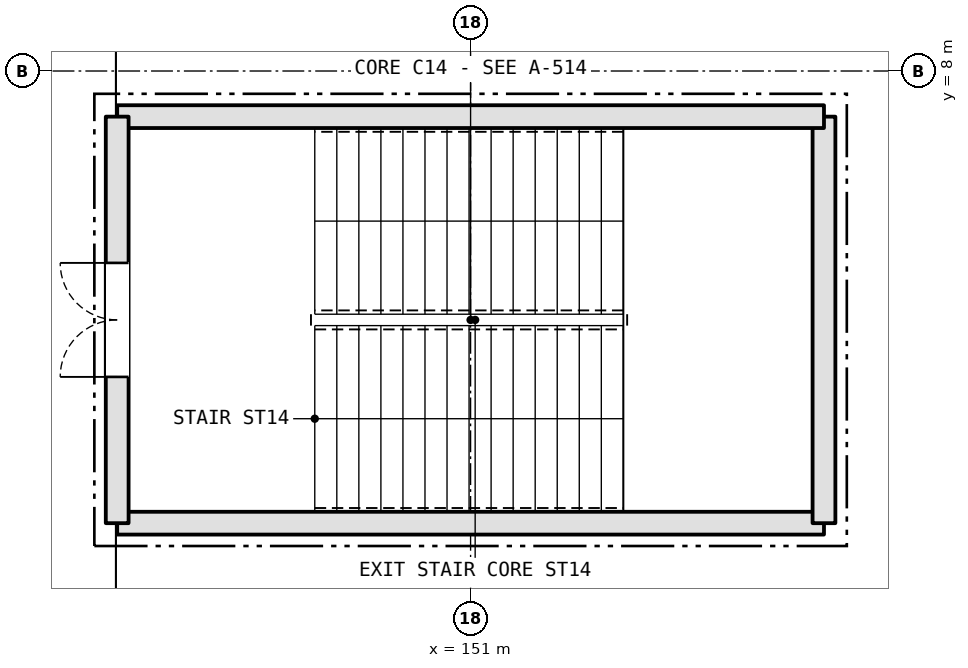
"""IFC4 building model, lengths in metres.
Left out: names, types, materials, properties, quantities, classifications, styles, units other than length and angle.
Written with IfcOpenShell. Run it as: python <this file> out.ifc"""

import sys

from ifc_helpers import new_model, si_unit, direction, frame, frame_2d, origin, place, context, subcontext, project, spatial, rectangle, extrude, element, fill, save


model = new_model("IFC4")
c1 = context("Model", 3, precision=1e-05, world=origin(), true_north=direction((0.0, 1.0)))
c2 = subcontext(c1, "Body", "Model", "MODEL_VIEW")
j1 = project(units=[si_unit("LENGTHUNIT", "METRE"), si_unit("PLANEANGLEUNIT", "RADIAN")], contexts=[c1])
p1 = place(None, origin())
s1 = spatial("IfcSite", under=j1, at=p1, CompositionType="ELEMENT")
p2 = place(p1, origin())
s2 = spatial("IfcBuilding", under=s1, at=p2, CompositionType="ELEMENT")
p3 = place(p2, origin())
s3 = spatial("IfcBuildingStorey", under=s2, at=p3, CompositionType="ELEMENT", Elevation=0.0)
p4 = place(p3, frame((146.35, 2.05, 0.0), z_axis=(0.0, 0.0, 1.0), x_axis=(1.0, 0.0, 0.0)))
e1 = element("IfcWall", 1, at=p4, inside=s3, PredefinedType="SHEAR", context=c2, shape_type="SweptSolid", body=[
    extrude(rectangle(XDim=9.299, YDim=0.3, at=frame_2d((4.65, 0.0))), origin(), (0.0, 0.0, 1.0), 5.14),
])
p5 = place(p3, frame((155.65, 2.05, 0.0), z_axis=(0.0, 0.0, 1.0), x_axis=(0.0, 1.0, 0.0)))
e2 = element("IfcWall", 2, at=p5, inside=s3, PredefinedType="SHEAR", context=c2, shape_type="SweptSolid", body=[
    extrude(rectangle(XDim=5.349, YDim=0.3, at=frame_2d((2.675, 0.0))), origin(), (0.0, 0.0, 1.0), 5.14),
])
p6 = place(p3, frame((155.65, 7.4, 0.0), z_axis=(0.0, 0.0, 1.0), x_axis=(-1.0, 0.0, 0.0)))
e3 = element("IfcWall", 3, at=p6, inside=s3, PredefinedType="SHEAR", context=c2, shape_type="SweptSolid", body=[
    extrude(rectangle(XDim=9.299, YDim=0.3, at=frame_2d((4.65, 0.0))), origin(), (0.0, 0.0, 1.0), 5.14),
])
p7 = place(p3, frame((146.35, 7.4, 0.0), z_axis=(0.0, 0.0, 1.0), x_axis=(0.0, -1.0, 0.0)))
e4 = element("IfcWall", 4, at=p7, inside=s3, PredefinedType="SHEAR", context=c2, shape_type="SweptSolid", body=[
    extrude(rectangle(XDim=5.349, YDim=0.3, at=frame_2d((2.675, 0.0))), origin(), (0.0, 0.0, 1.0), 5.14),
])
p8 = place(p7, frame((1.925, 0.0, 0.0)))
e5 = element("IfcOpeningElement", 5, at=p8, cuts=e4, PredefinedType="OPENING", context=c2, shape_type="SweptSolid", body=[
    extrude(rectangle(XDim=1.5, YDim=2.2, at=frame_2d((0.75, 1.1))), frame((0.0, 0.16, 0.0), z_axis=(0.0, -1.0, 0.0), x_axis=(1.0, 0.0, 0.0)), (0.0, 0.0, 1.0), 0.32),
])
p9 = place(p8, frame((1.5, 0.0, 0.0), z_axis=(0.0, 0.0, 1.0), x_axis=(-1.0, 0.0, 0.0)))
e6 = element("IfcDoor", 6, at=p9, inside=s3, OperationType="DOUBLE_DOOR_SINGLE_SWING", PredefinedType="DOOR", context=c2, shape_type="SweptSolid", body=[
    extrude(rectangle(XDim=1.5, YDim=2.2, at=frame_2d((0.75, 1.1))), frame((0.0, 0.025, 0.0), z_axis=(0.0, -1.0, 0.0), x_axis=(1.0, 0.0, 0.0)), (0.0, 0.0, 1.0), 0.05),
])
fill(e5, e6)
save(model, sys.argv[1])
